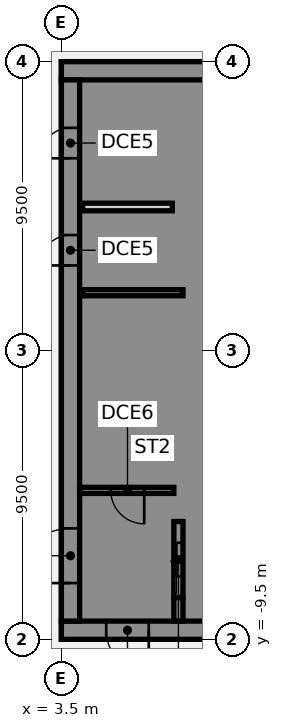
"""IFC4 building model, lengths in metres.
Left out: names, types, materials, properties, quantities, classifications, styles, units other than length and angle.
Written with IfcOpenShell. Run it as: python <this file> out.ifc"""

import sys

from ifc_helpers import new_model, si_unit, direction, frame, frame_2d, origin, place, context, subcontext, project, spatial, polyline, rectangle, outline, extrude, element, fill, save


model = new_model("IFC4")
c1 = context("Model", 3, precision=1e-05, world=origin(), true_north=direction((0.0, 1.0)))
c2 = subcontext(c1, "Body", "Model", "MODEL_VIEW")
j1 = project(units=[si_unit("LENGTHUNIT", "METRE"), si_unit("PLANEANGLEUNIT", "RADIAN")], contexts=[c1])
p1 = place(None, origin())
s1 = spatial("IfcSite", under=j1, at=p1, CompositionType="ELEMENT")
p2 = place(p1, origin())
s2 = spatial("IfcBuilding", under=s1, at=p2, CompositionType="ELEMENT")
p3 = place(p2, frame((0.0, 0.0, 83.5)))
s3 = spatial("IfcBuildingStorey", under=s2, at=p3, CompositionType="ELEMENT", Elevation=83.5)
p4 = place(p3, frame((16.5, -9.2, 0.0), z_axis=(0.0, 0.0, 1.0), x_axis=(-1.0, 0.0, 0.0)))
e1 = element("IfcWall", 1, at=p4, inside=s3, PredefinedType="SHEAR", context=c2, shape_type="SweptSolid", body=[
    extrude(rectangle(XDim=13.0, YDim=0.6, at=frame_2d((6.5, 0.0))), origin(), (0.0, 0.0, 1.0), 3.61),
])
p5 = place(p4, frame((4.15, 0.0, 0.0)))
e2 = element("IfcOpeningElement", 2, at=p5, cuts=e1, PredefinedType="OPENING", context=c2, shape_type="SweptSolid", body=[
    extrude(rectangle(XDim=1.4, YDim=2.1, at=frame_2d((0.7, 1.05))), frame((0.0, 0.31, 0.0), z_axis=(0.0, -1.0, 0.0), x_axis=(1.0, 0.0, 0.0)), (0.0, 0.0, 1.0), 0.62),
])
p6 = place(p4, frame((10.125, 0.0, 0.0)))
e3 = element("IfcOpeningElement", 3, at=p6, cuts=e1, PredefinedType="OPENING", context=c2, shape_type="SweptSolid", body=[
    extrude(rectangle(XDim=1.4, YDim=2.1, at=frame_2d((0.7, 1.05))), frame((0.0, 0.31, 0.0), z_axis=(0.0, -1.0, 0.0), x_axis=(1.0, 0.0, 0.0)), (0.0, 0.0, 1.0), 0.62),
])
p7 = place(p3, frame((16.5, 9.2, 0.0), z_axis=(0.0, 0.0, 1.0), x_axis=(-1.0, 0.0, 0.0)))
e4 = element("IfcWall", 4, at=p7, inside=s3, PredefinedType="SHEAR", context=c2, shape_type="SweptSolid", body=[
    extrude(rectangle(XDim=13.0, YDim=0.6, at=frame_2d((6.5, 0.0))), origin(), (0.0, 0.0, 1.0), 3.61),
])
p8 = place(p3, origin())
e5 = element("IfcWall", 5, at=p8, inside=s3, PredefinedType="SHEAR", context=c2, shape_type="SweptSolid", body=[
    extrude(outline(polyline([(9.8, -5.375), (7.5, -5.375), (7.5, -2.875), (9.8, -2.875), (9.8, -2.625), (7.5, -2.625), (7.5, -0.125), (9.8, -0.125), (9.8, 0.125), (7.5, 0.125), (7.5, 2.625), (9.8, 2.625), (9.8, 2.875), (7.5, 2.875), (7.5, 5.375), (9.8, 5.375), (9.8, 5.625), (7.5, 5.625), (7.5, 8.125), (9.8, 8.125), (9.8, 8.9), (7.5, 8.9), (7.2, 8.9), (7.2, -5.625), (7.5, -5.625), (9.8, -5.625), (9.8, -5.375)])), origin(), (0.0, 0.0, 1.0), 3.61),
])
p9 = place(p3, origin())
e6 = element("IfcWall", 6, at=p9, inside=s3, PredefinedType="SHEAR", context=c2, shape_type="SweptSolid", body=[
    extrude(outline(polyline([(7.5, -8.125), (7.5, -8.9), (9.8, -8.9), (9.8, -8.125), (9.8, -5.625), (9.55, -5.625), (9.55, -8.125), (7.5, -8.125)])), origin(), (0.0, 0.0, 1.0), 3.61),
])
p10 = place(p3, frame((7.35, -8.9, 0.0), z_axis=(0.0, 0.0, 1.0), x_axis=(0.0, 1.0, 0.0)))
e7 = element("IfcWall", 7, at=p10, inside=s3, PredefinedType="SHEAR", context=c2, shape_type="SweptSolid", body=[
    extrude(rectangle(XDim=0.775, YDim=0.3, at=frame_2d((0.387, 0.0))), origin(), (0.0, 0.0, 1.0), 3.61),
])
p11 = place(p3, frame((7.5, 1.9, 0.0), z_axis=(0.0, 0.0, 1.0), x_axis=(-1.0, 0.0, 0.0)))
e8 = element("IfcWall", 8, at=p11, inside=s3, PredefinedType="SHEAR", context=c2, shape_type="SweptSolid", body=[
    extrude(rectangle(XDim=3.3, YDim=0.2, at=frame_2d((1.65, 0.0))), origin(), (0.0, 0.0, 1.0), 3.61),
])
p12 = place(p3, frame((7.35, -8.125, 0.0), z_axis=(0.0, 0.0, 1.0), x_axis=(0.0, 1.0, 0.0)))
e9 = element("IfcWall", 9, at=p12, inside=s3, PredefinedType="SHEAR", context=c2, shape_type="SweptSolid", body=[
    extrude(rectangle(XDim=2.5, YDim=0.3, at=frame_2d((1.25, 0.0))), origin(), (0.0, 0.0, 1.0), 3.61),
])
p13 = place(p12, frame((0.7, 0.0, 0.0)))
e10 = element("IfcOpeningElement", 10, at=p13, cuts=e9, PredefinedType="OPENING", context=c2, shape_type="SweptSolid", body=[
    extrude(rectangle(XDim=1.1, YDim=2.1, at=frame_2d((0.55, 1.05))), frame((0.0, 0.16, 0.0), z_axis=(0.0, -1.0, 0.0), x_axis=(1.0, 0.0, 0.0)), (0.0, 0.0, 1.0), 0.32),
])
p14 = place(p3, frame((3.8, -8.9, 0.0), z_axis=(0.0, 0.0, 1.0), x_axis=(0.0, 1.0, 0.0)))
e11 = element("IfcWall", 11, at=p14, inside=s3, PredefinedType="SHEAR", context=c2, shape_type="SweptSolid", body=[
    extrude(rectangle(XDim=17.8, YDim=0.6, at=frame_2d((8.9, 0.0))), origin(), (0.0, 0.0, 1.0), 3.61),
])
p15 = place(p14, frame((1.25, 0.0, 0.0)))
e12 = element("IfcOpeningElement", 12, at=p15, cuts=e11, PredefinedType="OPENING", context=c2, shape_type="SweptSolid", body=[
    extrude(rectangle(XDim=1.8, YDim=2.1, at=frame_2d((0.9, 1.05))), frame((0.0, 0.31, 0.0), z_axis=(0.0, -1.0, 0.0), x_axis=(1.0, 0.0, 0.0)), (0.0, 0.0, 1.0), 0.62),
])
p16 = place(p14, frame((11.698, 0.0, 0.0)))
e13 = element("IfcOpeningElement", 13, at=p16, cuts=e11, PredefinedType="OPENING", context=c2, shape_type="SweptSolid", body=[
    extrude(rectangle(XDim=1.0, YDim=2.1, at=frame_2d((0.5, 1.05))), frame((0.0, 0.31, 0.0), z_axis=(0.0, -1.0, 0.0), x_axis=(1.0, 0.0, 0.0)), (0.0, 0.0, 1.0), 0.62),
])
p17 = place(p14, frame((15.222, 0.0, 0.0)))
e14 = element("IfcOpeningElement", 14, at=p17, cuts=e11, PredefinedType="OPENING", context=c2, shape_type="SweptSolid", body=[
    extrude(rectangle(XDim=1.0, YDim=2.1, at=frame_2d((0.5, 1.05))), frame((0.0, 0.31, 0.0), z_axis=(0.0, -1.0, 0.0), x_axis=(1.0, 0.0, 0.0)), (0.0, 0.0, 1.0), 0.62),
])
p18 = place(p3, frame((7.15, 4.72, 0.0), z_axis=(0.0, 0.0, 1.0), x_axis=(-1.0, 0.0, 0.0)))
e15 = element("IfcWall", 15, at=p18, inside=s3, PredefinedType="PARTITIONING", context=c2, shape_type="SweptSolid", body=[
    extrude(rectangle(XDim=2.95, YDim=0.25, at=frame_2d((1.475, 0.0))), origin(), (0.0, 0.0, 1.0), 3.61),
])
p19 = place(p3, frame((7.2, -4.6, 0.0), z_axis=(0.0, 0.0, 1.0), x_axis=(-1.0, 0.0, 0.0)))
e16 = element("IfcWall", 16, at=p19, inside=s3, PredefinedType="SHEAR", context=c2, shape_type="SweptSolid", body=[
    extrude(rectangle(XDim=3.1, YDim=0.2, at=frame_2d((1.55, 0.0))), origin(), (0.0, 0.0, 1.0), 3.61),
])
p20 = place(p19, frame((0.975, 0.0, 0.0)))
e17 = element("IfcOpeningElement", 17, at=p20, cuts=e16, PredefinedType="OPENING", context=c2, shape_type="SweptSolid", body=[
    extrude(rectangle(XDim=1.1, YDim=2.1, at=frame_2d((0.55, 1.05))), frame((0.0, 0.11, 0.0), z_axis=(0.0, -1.0, 0.0), x_axis=(1.0, 0.0, 0.0)), (0.0, 0.0, 1.0), 0.22),
])
p21 = place(p6, origin())
e18 = element("IfcDoor", 18, at=p21, inside=s3, OperationType="SINGLE_SWING_LEFT", PredefinedType="DOOR", context=c2, shape_type="SweptSolid", body=[
    extrude(rectangle(XDim=1.4, YDim=2.1, at=frame_2d((0.7, 1.05))), frame((0.0, 0.025, 0.0), z_axis=(0.0, -1.0, 0.0), x_axis=(1.0, 0.0, 0.0)), (0.0, 0.0, 1.0), 0.05),
])
fill(e3, e18)
p22 = place(p15, origin())
e19 = element("IfcDoor", 19, at=p22, inside=s3, OperationType="SINGLE_SWING_LEFT", PredefinedType="DOOR", context=c2, shape_type="SweptSolid", body=[
    extrude(rectangle(XDim=1.8, YDim=2.1, at=frame_2d((0.9, 1.05))), frame((0.0, 0.025, 0.0), z_axis=(0.0, -1.0, 0.0), x_axis=(1.0, 0.0, 0.0)), (0.0, 0.0, 1.0), 0.05),
])
fill(e12, e19)
p23 = place(p16, origin())
e20 = element("IfcDoor", 20, at=p23, inside=s3, OperationType="SINGLE_SWING_LEFT", PredefinedType="DOOR", context=c2, shape_type="SweptSolid", body=[
    extrude(rectangle(XDim=1.0, YDim=2.1, at=frame_2d((0.5, 1.05))), frame((0.0, -0.225, 0.0), z_axis=(0.0, -1.0, 0.0), x_axis=(1.0, 0.0, 0.0)), (0.0, 0.0, 1.0), 0.05),
])
fill(e13, e20)
p24 = place(p17, origin())
e21 = element("IfcDoor", 21, at=p24, inside=s3, OperationType="SINGLE_SWING_LEFT", PredefinedType="DOOR", context=c2, shape_type="SweptSolid", body=[
    extrude(rectangle(XDim=1.0, YDim=2.1, at=frame_2d((0.5, 1.05))), frame((0.0, -0.225, 0.0), z_axis=(0.0, -1.0, 0.0), x_axis=(1.0, 0.0, 0.0)), (0.0, 0.0, 1.0), 0.05),
])
fill(e14, e21)
p25 = place(p20, origin())
e22 = element("IfcDoor", 22, at=p25, inside=s3, OperationType="SINGLE_SWING_LEFT", PredefinedType="DOOR", context=c2, shape_type="SweptSolid", body=[
    extrude(rectangle(XDim=1.1, YDim=2.1, at=frame_2d((0.55, 1.05))), frame((0.0, 0.025, 0.0), z_axis=(0.0, -1.0, 0.0), x_axis=(1.0, 0.0, 0.0)), (0.0, 0.0, 1.0), 0.05),
])
fill(e17, e22)
p26 = place(p13, origin())
e23 = element("IfcDoor", 23, at=p26, inside=s3, OperationType="SLIDING_TO_LEFT", PredefinedType="DOOR", context=c2, shape_type="SweptSolid", body=[
    extrude(rectangle(XDim=1.1, YDim=2.1, at=frame_2d((0.55, 1.05))), frame((0.0, 0.025, 0.0), z_axis=(0.0, -1.0, 0.0), x_axis=(1.0, 0.0, 0.0)), (0.0, 0.0, 1.0), 0.05),
])
fill(e10, e23)
save(model, sys.argv[1])
